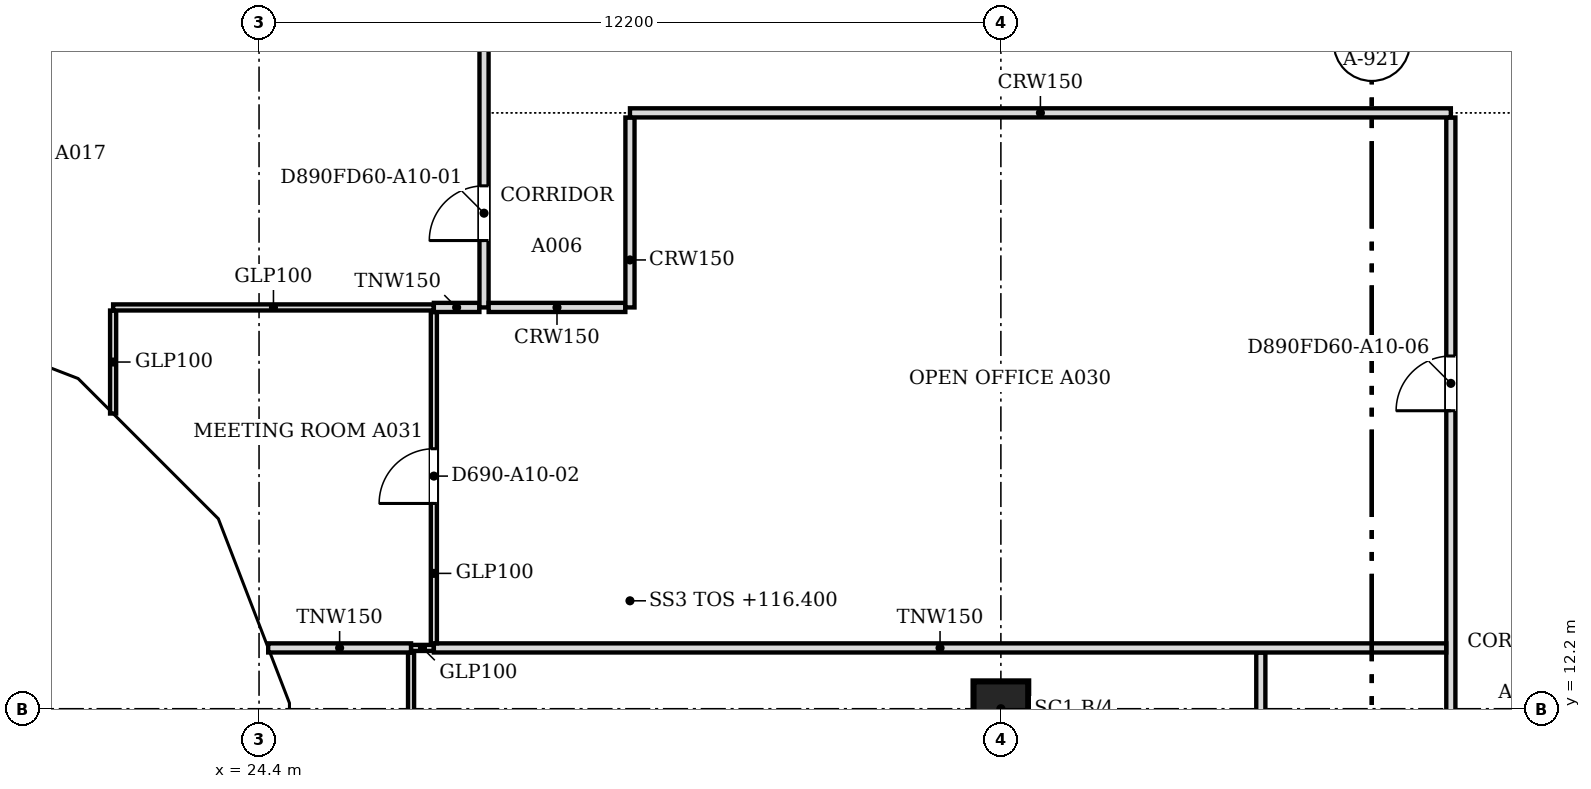
"""IFC4 building model, lengths in metres.
Left out: names, types, materials, properties, quantities, classifications, styles, units other than length and angle.
Written with IfcOpenShell. Run it as: python <this file> out.ifc"""

import sys

from ifc_helpers import new_model, si_unit, direction, frame, frame_2d, origin, origin_2d, place, context, subcontext, project, spatial, polyline, rectangle, outline, extrude, faceted_brep, source, transform, mapped, element, fill, save


model = new_model("IFC4")
c1 = context("Model", 3, precision=1e-05, world=origin(), true_north=direction((0.0, 1.0)))
c2 = subcontext(c1, "Body", "Model", "MODEL_VIEW")
j1 = project(units=[si_unit("LENGTHUNIT", "METRE"), si_unit("PLANEANGLEUNIT", "RADIAN")], contexts=[c1])
p1 = place(None, origin())
s1 = spatial("IfcSite", under=j1, at=p1, CompositionType="ELEMENT")
p2 = place(p1, origin())
s2 = spatial("IfcBuilding", under=s1, at=p2, CompositionType="ELEMENT")
p3 = place(p2, frame((0.0, 0.0, 116.4)))
s3 = spatial("IfcBuildingStorey", under=s2, at=p3, CompositionType="ELEMENT", Elevation=116.4)
p4 = place(p3, frame((36.6, 12.2, 0.0), z_axis=(0.0, 0.0, 1.0), x_axis=(1.0, 0.0, 0.0)))
e1 = element("IfcColumn", 1, at=p4, inside=s3, PredefinedType="COLUMN", context=c2, shape_type="SweptSolid", body=[
    extrude(rectangle(XDim=0.9, YDim=0.9, at=origin_2d()), origin(), (0.0, 0.0, 1.0), 3.6),
])
m1 = source(origin(), c2, "Body", "Brep", [
    faceted_brep([(3.096, -0.25, 7.536), (0.047, -0.25, 3.856), (0.047, -0.25, 3.744), (3.096, -0.25, 0.064), (0.0, 0.25, 3.8), (3.149, 0.25, 7.6), (3.202, 0.25, 7.536), (3.202, 0.25, 0.064), (3.149, 0.25, 0.0), (3.149, -0.0, 0.0), (3.149, -0.0, 7.6), (0.0, 0.0, 3.8)], [[[0, 1, 2, 3]], [[4, 5, 6, 7, 8]], [[8, 7, 9]], [[6, 5, 10]], [[5, 4, 11, 1, 0, 10]], [[4, 8, 9, 3, 2, 11]], [[11, 2, 1]], [[3, 9, 7, 6, 10, 0]]]),
])
p5 = place(p3, frame((18.346, 18.55, -3.8), z_axis=(0.0, 0.0, 1.0), x_axis=(0.932985567668, -0.359913782069, 0.0)))
e2 = element("IfcWall", 2, at=p5, inside=s3, PredefinedType="SOLIDWALL", context=c2, shape_type="MappedRepresentation", body=[
    mapped(m1, transform((0.0, 0.0, 0.0), scale=1.0)),
])
m2 = source(origin(), c2, "Body", "SweptSolid", [
    extrude(outline(polyline([(2.949, 6.967), (0.325, 3.8), (2.949, 0.633), (2.949, 6.967)])), frame((0.0, 0.26, 0.0), z_axis=(0.0, -1.0, 0.0), x_axis=(1.0, 0.0, 0.0)), (0.0, 0.0, 1.0), 0.52),
])
p6 = place(p5, origin())
e3 = element("IfcOpeningElement", 3, at=p6, cuts=e2, PredefinedType="OPENING", context=c2, shape_type="MappedRepresentation", body=[
    mapped(m2, transform((0.0, 0.0, 0.0), scale=1.0)),
])
m3 = source(origin(), c2, "Body", "Brep", [
    faceted_brep([(0.106, -0.25, 0.064), (3.156, -0.25, 3.736), (3.156, -0.25, 3.864), (0.106, -0.25, 7.536), (0.0, 0.25, 7.536), (0.053, 0.25, 7.6), (3.209, 0.25, 3.8), (0.053, 0.25, 0.0), (0.0, 0.25, 0.064), (3.209, -0.0, 3.8), (0.053, 0.0, 0.0), (0.053, 0.0, 7.6)], [[[0, 1, 2, 3]], [[4, 5, 6, 7, 8]], [[7, 6, 9, 1, 0, 10]], [[6, 5, 11, 3, 2, 9]], [[5, 4, 11]], [[8, 7, 10]], [[8, 10, 0, 3, 11, 4]], [[1, 9, 2]]]),
])
p7 = place(p3, frame((21.248, 17.454, -3.8), z_axis=(0.0, 0.0, 1.0), x_axis=(0.707106781187, -0.707106781187, 0.0)))
e4 = element("IfcWall", 4, at=p7, inside=s3, PredefinedType="SOLIDWALL", context=c2, shape_type="MappedRepresentation", body=[
    mapped(m3, transform((0.0, 0.0, 0.0), scale=1.0)),
])
m4 = source(origin(), c2, "Body", "SweptSolid", [
    extrude(outline(polyline([(0.253, 0.632), (2.884, 3.8), (0.253, 6.968), (0.253, 0.632)])), frame((0.0, 0.26, 0.0), z_axis=(0.0, -1.0, 0.0), x_axis=(1.0, 0.0, 0.0)), (0.0, 0.0, 1.0), 0.52),
])
p8 = place(p7, origin())
e5 = element("IfcOpeningElement", 5, at=p8, cuts=e4, PredefinedType="OPENING", context=c2, shape_type="MappedRepresentation", body=[
    mapped(m4, transform((0.0, 0.0, 0.0), scale=1.0)),
])
m5 = source(origin(), c2, "Body", "Brep", [
    faceted_brep([(3.103, -0.25, 7.544), (0.053, -0.25, 3.864), (0.053, -0.25, 3.736), (3.103, -0.25, 0.056), (0.0, 0.25, 3.8), (3.149, 0.25, 7.6), (3.196, 0.25, 7.543), (3.196, 0.25, 0.057), (3.149, 0.25, 0.0), (3.149, -0.0, 0.0), (3.149, -0.0, 7.6), (0.0, 0.0, 3.8)], [[[0, 1, 2, 3]], [[4, 5, 6, 7, 8]], [[8, 7, 9]], [[6, 5, 10]], [[5, 4, 11, 1, 0, 10]], [[4, 8, 9, 3, 2, 11]], [[11, 2, 1]], [[3, 9, 7, 6, 10, 0]]]),
])
p9 = place(p3, frame((23.517, 15.185, -3.8), z_axis=(0.0, 0.0, 1.0), x_axis=(0.359864468756, -0.933004589553, 0.0)))
e6 = element("IfcWall", 6, at=p9, inside=s3, PredefinedType="SOLIDWALL", context=c2, shape_type="MappedRepresentation", body=[
    mapped(m5, transform((0.0, 0.0, 0.0), scale=1.0)),
])
p10 = place(p9, origin())
e7 = element("IfcOpeningElement", 7, at=p10, cuts=e6, PredefinedType="OPENING", context=c2, shape_type="MappedRepresentation", body=[
    mapped(m2, transform((0.0, 0.0, 0.0), scale=1.0)),
])
m6 = source(origin(), c2, "Body", "Brep", [
    faceted_brep([(0.093, -0.25, 0.057), (3.143, -0.25, 3.8), (0.093, -0.25, 7.543), (0.0, 0.25, 7.544), (0.047, 0.25, 7.6), (3.143, 0.25, 3.8), (0.047, 0.25, 0.0), (0.0, 0.25, 0.056), (0.047, 0.0, 0.0), (0.047, 0.0, 7.6)], [[[0, 1, 2]], [[3, 4, 5, 6, 7]], [[6, 5, 1, 0, 8]], [[5, 4, 9, 2, 1]], [[4, 3, 9]], [[7, 6, 8]], [[7, 8, 0, 2, 9, 3]]]),
])
p11 = place(p3, frame((24.65, 12.293, -3.8), z_axis=(0.0, 0.0, 1.0), x_axis=(0.0, -1.0, 0.0)))
e8 = element("IfcWall", 8, at=p11, inside=s3, PredefinedType="SOLIDWALL", context=c2, shape_type="MappedRepresentation", body=[
    mapped(m6, transform((0.0, 0.0, 0.0), scale=1.0)),
])
m7 = source(origin(), c2, "Body", "SweptSolid", [
    extrude(outline(polyline([(0.247, 0.641), (2.821, 3.8), (0.247, 6.959), (0.247, 0.641)])), frame((0.0, 0.26, 0.0), z_axis=(0.0, -1.0, 0.0), x_axis=(1.0, 0.0, 0.0)), (0.0, 0.0, 1.0), 0.52),
])
p12 = place(p11, origin())
e9 = element("IfcOpeningElement", 9, at=p12, cuts=e8, PredefinedType="OPENING", context=c2, shape_type="MappedRepresentation", body=[
    mapped(m7, transform((0.0, 0.0, 0.0), scale=1.0)),
])
p13 = place(p2, frame((0.0, 0.0, 120.2)))
s4 = spatial("IfcBuildingStorey", under=s2, at=p13, CompositionType="ELEMENT", Elevation=120.2)
m8 = source(origin(), c2, "Body", "Brep", [
    faceted_brep([(0.093, -0.25, 0.056), (3.143, -0.25, 3.736), (3.143, -0.25, 3.864), (0.093, -0.25, 7.544), (0.0, 0.25, 7.543), (0.047, 0.25, 7.6), (3.196, 0.25, 3.8), (0.047, 0.25, 0.0), (0.0, 0.25, 0.057), (3.196, -0.0, 3.8), (0.047, 0.0, 0.0), (0.047, 0.0, 7.6)], [[[0, 1, 2, 3]], [[4, 5, 6, 7, 8]], [[7, 6, 9, 1, 0, 10]], [[6, 5, 11, 3, 2, 9]], [[5, 4, 11]], [[8, 7, 10]], [[8, 10, 0, 3, 11, 4]], [[1, 9, 2]]]),
])
p14 = place(p13, frame((18.303, 18.567, -3.8), z_axis=(0.0, 0.0, 1.0), x_axis=(0.932978940178, -0.359930961693, 0.0)))
e10 = element("IfcWall", 10, at=p14, inside=s4, PredefinedType="SOLIDWALL", context=c2, shape_type="MappedRepresentation", body=[
    mapped(m8, transform((0.0, 0.0, 0.0), scale=1.0)),
])
m9 = source(origin(), c2, "Body", "SweptSolid", [
    extrude(outline(polyline([(0.247, 0.633), (2.871, 3.8), (0.247, 6.967), (0.247, 0.633)])), frame((0.0, 0.26, 0.0), z_axis=(0.0, -1.0, 0.0), x_axis=(1.0, 0.0, 0.0)), (0.0, 0.0, 1.0), 0.52),
])
p15 = place(p14, origin())
e11 = element("IfcOpeningElement", 11, at=p15, cuts=e10, PredefinedType="OPENING", context=c2, shape_type="MappedRepresentation", body=[
    mapped(m9, transform((0.0, 0.0, 0.0), scale=1.0)),
])
m10 = source(origin(), c2, "Body", "Brep", [
    faceted_brep([(3.103, -0.25, 7.536), (0.053, -0.25, 3.864), (0.053, -0.25, 3.736), (3.103, -0.25, 0.064), (0.0, 0.25, 3.8), (3.156, 0.25, 7.6), (3.209, 0.25, 7.536), (3.209, 0.25, 0.064), (3.156, 0.25, 0.0), (3.156, -0.0, 0.0), (3.156, -0.0, 7.6), (0.0, 0.0, 3.8)], [[[0, 1, 2, 3]], [[4, 5, 6, 7, 8]], [[8, 7, 9]], [[6, 5, 10]], [[5, 4, 11, 1, 0, 10]], [[4, 8, 9, 3, 2, 11]], [[11, 2, 1]], [[3, 9, 7, 6, 10, 0]]]),
])
p16 = place(p13, frame((21.285, 17.417, -3.8), z_axis=(0.0, 0.0, 1.0), x_axis=(0.707106781187, -0.707106781187, 0.0)))
e12 = element("IfcWall", 12, at=p16, inside=s4, PredefinedType="SOLIDWALL", context=c2, shape_type="MappedRepresentation", body=[
    mapped(m10, transform((0.0, 0.0, 0.0), scale=1.0)),
])
m11 = source(origin(), c2, "Body", "SweptSolid", [
    extrude(outline(polyline([(2.956, 6.968), (0.325, 3.8), (2.956, 0.632), (2.956, 6.968)])), frame((0.0, 0.26, 0.0), z_axis=(0.0, -1.0, 0.0), x_axis=(1.0, 0.0, 0.0)), (0.0, 0.0, 1.0), 0.52),
])
p17 = place(p16, origin())
e13 = element("IfcOpeningElement", 13, at=p17, cuts=e12, PredefinedType="OPENING", context=c2, shape_type="MappedRepresentation", body=[
    mapped(m11, transform((0.0, 0.0, 0.0), scale=1.0)),
])
m12 = source(origin(), c2, "Body", "Brep", [
    faceted_brep([(0.106, -0.25, 0.064), (3.156, -0.25, 3.744), (3.156, -0.25, 3.856), (0.106, -0.25, 7.536), (0.0, 0.25, 7.536), (0.053, 0.25, 7.6), (3.202, 0.25, 3.8), (0.053, 0.25, 0.0), (0.0, 0.25, 0.064), (3.202, -0.0, 3.8), (0.053, 0.0, 0.0), (0.053, 0.0, 7.6)], [[[0, 1, 2, 3]], [[4, 5, 6, 7, 8]], [[7, 6, 9, 1, 0, 10]], [[6, 5, 11, 3, 2, 9]], [[5, 4, 11]], [[8, 7, 10]], [[8, 10, 0, 3, 11, 4]], [[1, 9, 2]]]),
])
p18 = place(p13, frame((23.497, 15.234, -3.8), z_axis=(0.0, 0.0, 1.0), x_axis=(0.359913782069, -0.932985567668, 0.0)))
e14 = element("IfcWall", 14, at=p18, inside=s4, PredefinedType="SOLIDWALL", context=c2, shape_type="MappedRepresentation", body=[
    mapped(m12, transform((0.0, 0.0, 0.0), scale=1.0)),
])
m13 = source(origin(), c2, "Body", "SweptSolid", [
    extrude(outline(polyline([(0.253, 0.633), (2.878, 3.8), (0.253, 6.967), (0.253, 0.633)])), frame((0.0, 0.26, 0.0), z_axis=(0.0, -1.0, 0.0), x_axis=(1.0, 0.0, 0.0)), (0.0, 0.0, 1.0), 0.52),
])
p19 = place(p18, origin())
e15 = element("IfcOpeningElement", 15, at=p19, cuts=e14, PredefinedType="OPENING", context=c2, shape_type="MappedRepresentation", body=[
    mapped(m13, transform((0.0, 0.0, 0.0), scale=1.0)),
])
m14 = source(origin(), c2, "Body", "Brep", [
    faceted_brep([(3.096, -0.25, 0.0), (6.1, -0.25, 3.8), (3.096, -0.25, 7.6), (0.047, -0.25, 3.857), (0.047, -0.25, 3.743), (0.0, 0.25, 3.8), (3.096, 0.25, 7.6), (6.053, 0.25, 3.859), (6.053, 0.25, 3.741), (3.096, 0.25, 0.0), (6.1, -0.0, 3.8), (0.0, 0.0, 3.8)], [[[0, 1, 2, 3, 4]], [[5, 6, 7, 8, 9]], [[9, 8, 10, 1, 0]], [[7, 6, 2, 1, 10]], [[6, 5, 11, 3, 2]], [[5, 9, 0, 4, 11]], [[11, 4, 3]], [[10, 8, 7]]]),
])
p20 = place(p13, frame((24.65, 12.247, -3.8), z_axis=(0.0, 0.0, 1.0), x_axis=(0.0, -1.0, 0.0)))
e16 = element("IfcWall", 16, at=p20, inside=s4, PredefinedType="SOLIDWALL", context=c2, shape_type="MappedRepresentation", body=[
    mapped(m14, transform((0.0, 0.0, 0.0), scale=1.0)),
])
m15 = source(origin(), c2, "Body", "SweptSolid", [
    extrude(outline(polyline([(3.094, 0.399), (5.781, 3.8), (3.094, 7.201), (0.323, 3.8), (3.094, 0.399)])), frame((0.0, 0.26, 0.0), z_axis=(0.0, -1.0, 0.0), x_axis=(1.0, 0.0, 0.0)), (0.0, 0.0, 1.0), 0.52),
])
p21 = place(p20, origin())
e17 = element("IfcOpeningElement", 17, at=p21, cuts=e16, PredefinedType="OPENING", context=c2, shape_type="MappedRepresentation", body=[
    mapped(m15, transform((0.0, 0.0, 0.0), scale=1.0)),
])
p22 = place(p3, frame((44.0, 0.5, 0.0), z_axis=(0.0, 0.0, 1.0), x_axis=(0.0, 1.0, 0.0)))
e18 = element("IfcWall", 18, at=p22, inside=s3, PredefinedType="PARTITIONING", context=c2, shape_type="SweptSolid", body=[
    extrude(rectangle(XDim=21.424, YDim=0.15, at=frame_2d((10.712, 0.0))), origin(), (0.0, 0.0, 1.0), 3.067),
])
m16 = source(origin(), c2, "Body", "SweptSolid", [
    extrude(rectangle(XDim=0.9, YDim=2.1, at=frame_2d((0.45, 1.05))), frame((0.0, 0.085, 0.0), z_axis=(0.0, -1.0, 0.0), x_axis=(1.0, 0.0, 0.0)), (0.0, 0.0, 1.0), 0.17),
])
p23 = place(p22, frame((16.601, 0.0, 0.0)))
e19 = element("IfcOpeningElement", 19, at=p23, cuts=e18, PredefinedType="OPENING", context=c2, shape_type="MappedRepresentation", body=[
    mapped(m16, transform((0.0, 0.0, 0.0), scale=1.0)),
])
m17 = source(origin(), c2, "Body", "SweptSolid", [
    extrude(rectangle(XDim=1.0, YDim=2.1, at=frame_2d((0.5, 1.05))), frame((0.0, 0.085, 0.0), z_axis=(0.0, -1.0, 0.0), x_axis=(1.0, 0.0, 0.0)), (0.0, 0.0, 1.0), 0.17),
])
p24 = place(p22, frame((7.7, 0.0, 0.0)))
e20 = element("IfcOpeningElement", 20, at=p24, cuts=e18, PredefinedType="OPENING", context=c2, shape_type="MappedRepresentation", body=[
    mapped(m17, transform((0.0, 0.0, 0.0), scale=1.0)),
])
p25 = place(p3, frame((26.9, 4.2, 0.0), z_axis=(0.0, 0.0, 1.0), x_axis=(0.0, 1.0, 0.0)))
e21 = element("IfcWall", 21, at=p25, inside=s3, PredefinedType="PARTITIONING", context=c2, shape_type="SweptSolid", body=[
    extrude(rectangle(XDim=8.924, YDim=0.1, at=frame_2d((4.462, 0.0))), origin(), (0.0, 0.0, 1.0), 3.067),
])
m18 = source(origin(), c2, "Body", "SweptSolid", [
    extrude(rectangle(XDim=0.9, YDim=2.1, at=frame_2d((0.45, 1.05))), frame((0.0, 0.06, 0.0), z_axis=(0.0, -1.0, 0.0), x_axis=(1.0, 0.0, 0.0)), (0.0, 0.0, 1.0), 0.12),
])
p26 = place(p25, frame((6.416, 0.0, 0.0)))
e22 = element("IfcOpeningElement", 22, at=p26, cuts=e21, PredefinedType="OPENING", context=c2, shape_type="MappedRepresentation", body=[
    mapped(m18, transform((0.0, 0.0, 0.0), scale=1.0)),
])
p27 = place(p25, frame((2.0, 0.0, 0.0)))
e23 = element("IfcOpeningElement", 23, at=p27, cuts=e21, PredefinedType="OPENING", context=c2, shape_type="MappedRepresentation", body=[
    mapped(m18, transform((0.0, 0.0, 0.0), scale=1.0)),
])
p28 = place(p3, frame((40.875, 4.2, 0.0), z_axis=(0.0, 0.0, 1.0), x_axis=(0.0, 1.0, 0.0)))
e24 = element("IfcWall", 24, at=p28, inside=s3, PredefinedType="PARTITIONING", context=c2, shape_type="SweptSolid", body=[
    extrude(rectangle(XDim=8.924, YDim=0.15, at=frame_2d((4.462, 0.0))), origin(), (0.0, 0.0, 1.0), 3.067),
])
p29 = place(p28, frame((4.0, 0.0, 0.0)))
e25 = element("IfcOpeningElement", 25, at=p29, cuts=e24, PredefinedType="OPENING", context=c2, shape_type="MappedRepresentation", body=[
    mapped(m16, transform((0.0, 0.0, 0.0), scale=1.0)),
])
p30 = place(p3, frame((24.55, 13.2, 0.0), z_axis=(0.0, 0.0, 1.0), x_axis=(1.0, 0.0, 0.0)))
e26 = element("IfcWall", 26, at=p30, inside=s3, PredefinedType="PARTITIONING", context=c2, shape_type="SweptSolid", body=[
    extrude(rectangle(XDim=2.35, YDim=0.15, at=frame_2d((1.175, 0.0))), origin(), (0.0, 0.0, 1.0), 3.067),
])
p31 = place(p3, frame((26.901, 13.2, 0.0), z_axis=(0.0, 0.0, 1.0), x_axis=(1.0, 0.0, 0.0)))
e27 = element("IfcWall", 27, at=p31, inside=s3, PredefinedType="PARTITIONING", context=c2, shape_type="SweptSolid", body=[
    extrude(rectangle(XDim=0.373, YDim=0.1, at=frame_2d((0.187, 0.0))), origin(), (0.0, 0.0, 1.0), 3.067),
])
p32 = place(p3, frame((27.275, 13.2, 0.0), z_axis=(0.0, 0.0, 1.0), x_axis=(1.0, 0.0, 0.0)))
e28 = element("IfcWall", 28, at=p32, inside=s3, PredefinedType="PARTITIONING", context=c2, shape_type="SweptSolid", body=[
    extrude(rectangle(XDim=16.649, YDim=0.15, at=frame_2d((8.325, 0.0))), origin(), (0.0, 0.0, 1.0), 3.067),
])
p33 = place(p3, frame((27.275, 13.276, 0.0), z_axis=(0.0, 0.0, 1.0), x_axis=(0.0, 1.0, 0.0)))
e29 = element("IfcWall", 29, at=p33, inside=s3, PredefinedType="PARTITIONING", context=c2, shape_type="SweptSolid", body=[
    extrude(rectangle(XDim=5.448, YDim=0.1, at=frame_2d((2.724, 0.0))), origin(), (0.0, 0.0, 1.0), 3.067),
])
p34 = place(p33, frame((2.3, 0.0, 0.0)))
e30 = element("IfcOpeningElement", 30, at=p34, cuts=e29, PredefinedType="OPENING", context=c2, shape_type="MappedRepresentation", body=[
    mapped(m18, transform((0.0, 0.0, 0.0), scale=1.0)),
])
p35 = place(p3, frame((22.0, 17.055, 0.0), z_axis=(0.0, 0.0, 1.0), x_axis=(0.0, 1.0, 0.0)))
e31 = element("IfcWall", 31, at=p35, inside=s3, PredefinedType="PARTITIONING", context=c2, shape_type="SweptSolid", body=[
    extrude(rectangle(XDim=1.694, YDim=0.1, at=frame_2d((0.847, 0.0))), origin(), (0.0, 0.0, 1.0), 3.067),
])
p36 = place(p3, frame((22.0, 18.8, 0.0), z_axis=(0.0, 0.0, 1.0), x_axis=(1.0, 0.0, 0.0)))
e32 = element("IfcWall", 32, at=p36, inside=s3, PredefinedType="PARTITIONING", context=c2, shape_type="SweptSolid", body=[
    extrude(rectangle(XDim=5.274, YDim=0.1, at=frame_2d((2.637, 0.0))), origin(), (0.0, 0.0, 1.0), 3.067),
])
p37 = place(p3, frame((27.275, 18.8, 0.0), z_axis=(0.0, 0.0, 1.0), x_axis=(1.0, 0.0, 0.0)))
e33 = element("IfcWall", 33, at=p37, inside=s3, PredefinedType="PARTITIONING", context=c2, shape_type="SweptSolid", body=[
    extrude(rectangle(XDim=0.749, YDim=0.15, at=frame_2d((0.375, 0.0))), origin(), (0.0, 0.0, 1.0), 3.067),
])
p38 = place(p3, frame((28.1, 18.8, 0.0), z_axis=(0.0, 0.0, 1.0), x_axis=(0.0, 1.0, 0.0)))
e34 = element("IfcWall", 34, at=p38, inside=s3, PredefinedType="PARTITIONING", context=c2, shape_type="SweptSolid", body=[
    extrude(rectangle(XDim=26.024, YDim=0.15, at=frame_2d((13.012, 0.0))), origin(), (0.0, 0.0, 1.0), 3.067),
])
p39 = place(p38, frame((1.1, 0.0, 0.0)))
e35 = element("IfcOpeningElement", 35, at=p39, cuts=e34, PredefinedType="OPENING", context=c2, shape_type="MappedRepresentation", body=[
    mapped(m16, transform((0.0, 0.0, 0.0), scale=1.0)),
])
p40 = place(p38, frame((14.301, 0.0, 0.0)))
e36 = element("IfcOpeningElement", 36, at=p40, cuts=e34, PredefinedType="OPENING", context=c2, shape_type="MappedRepresentation", body=[
    mapped(m16, transform((0.0, 0.0, 0.0), scale=1.0)),
])
p41 = place(p38, frame((8.2, 0.0, 0.0)))
e37 = element("IfcOpeningElement", 37, at=p41, cuts=e34, PredefinedType="OPENING", context=c2, shape_type="MappedRepresentation", body=[
    mapped(m16, transform((0.0, 0.0, 0.0), scale=1.0)),
])
p42 = place(p38, frame((21.5, 0.0, 0.0)))
e38 = element("IfcOpeningElement", 38, at=p42, cuts=e34, PredefinedType="OPENING", context=c2, shape_type="MappedRepresentation", body=[
    mapped(m16, transform((0.0, 0.0, 0.0), scale=1.0)),
])
p43 = place(p3, frame((28.176, 18.8, 0.0), z_axis=(0.0, 0.0, 1.0), x_axis=(1.0, 0.0, 0.0)))
e39 = element("IfcWall", 39, at=p43, inside=s3, PredefinedType="PARTITIONING", context=c2, shape_type="SweptSolid", body=[
    extrude(rectangle(XDim=2.248, YDim=0.15, at=frame_2d((1.124, 0.0))), origin(), (0.0, 0.0, 1.0), 3.067),
])
p44 = place(p3, frame((30.5, 18.8, 0.0), z_axis=(0.0, 0.0, 1.0), x_axis=(0.0, 1.0, 0.0)))
e40 = element("IfcWall", 40, at=p44, inside=s3, PredefinedType="PARTITIONING", context=c2, shape_type="SweptSolid", body=[
    extrude(rectangle(XDim=3.124, YDim=0.15, at=frame_2d((1.562, 0.0))), origin(), (0.0, 0.0, 1.0), 3.067),
])
p45 = place(p3, frame((30.5, 22.0, 0.0), z_axis=(0.0, 0.0, 1.0), x_axis=(1.0, 0.0, 0.0)))
e41 = element("IfcWall", 41, at=p45, inside=s3, PredefinedType="PARTITIONING", context=c2, shape_type="SweptSolid", body=[
    extrude(rectangle(XDim=13.5, YDim=0.15, at=frame_2d((6.75, 0.0))), origin(), (0.0, 0.0, 1.0), 3.067),
])
m19 = source(origin(), c2, "Body", "SweptSolid", [
    extrude(rectangle(XDim=0.9, YDim=2.1, at=frame_2d((0.45, 1.05))), frame((0.0, 0.025, 0.0), z_axis=(0.0, -1.0, 0.0), x_axis=(1.0, 0.0, 0.0)), (0.0, 0.0, 1.0), 0.05),
])
p46 = place(p39, origin())
e42 = element("IfcDoor", 42, at=p46, inside=s3, OperationType="SINGLE_SWING_LEFT", PredefinedType="DOOR", context=c2, shape_type="MappedRepresentation", body=[
    mapped(m19, transform((0.0, 0.0, 0.0), scale=1.0)),
])
fill(e35, e42)
p47 = place(p34, origin())
e43 = element("IfcDoor", 43, at=p47, inside=s3, OperationType="SINGLE_SWING_LEFT", PredefinedType="DOOR", context=c2, shape_type="MappedRepresentation", body=[
    mapped(m19, transform((0.0, 0.0, 0.0), scale=1.0)),
])
fill(e30, e43)
p48 = place(p23, origin())
e44 = element("IfcDoor", 44, at=p48, inside=s3, OperationType="SINGLE_SWING_LEFT", PredefinedType="DOOR", context=c2, shape_type="MappedRepresentation", body=[
    mapped(m19, transform((0.0, 0.0, 0.0), scale=1.0)),
])
fill(e19, e44)
save(model, sys.argv[1])
